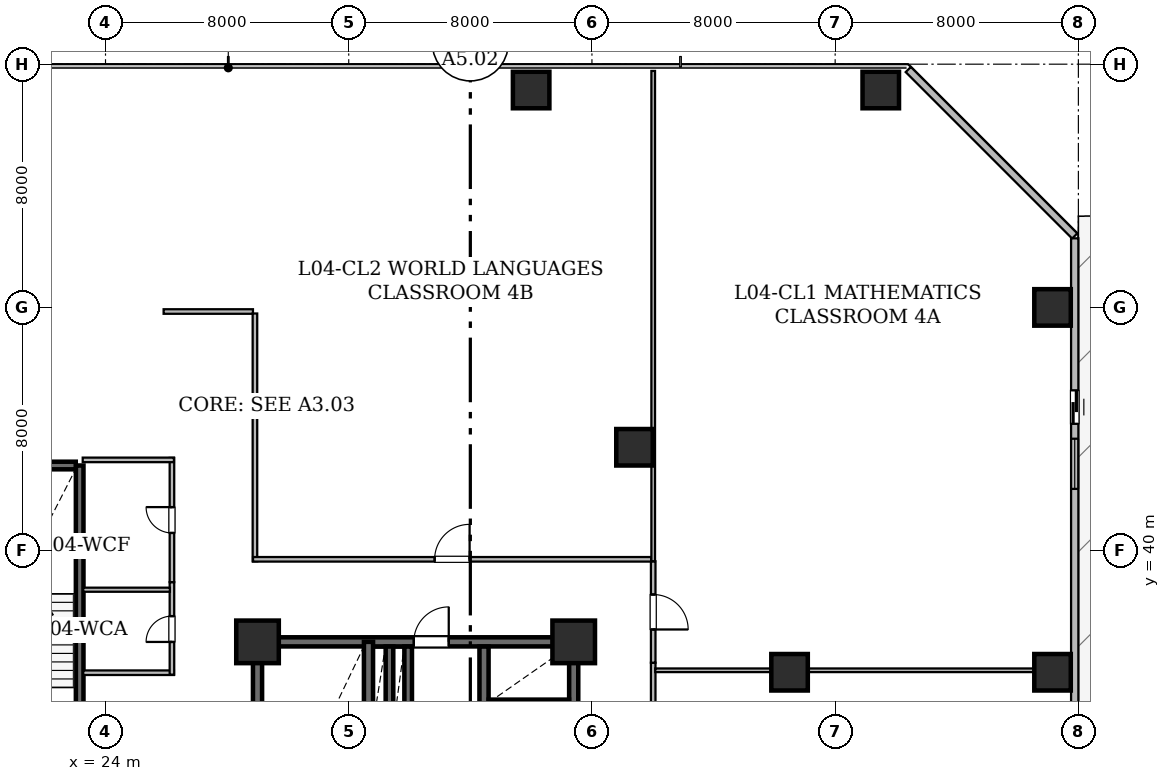
"""IFC4 building model, lengths in metres.
Left out: names, types, materials, properties, quantities, classifications, styles, units other than length and angle.
Written with IfcOpenShell. Run it as: python <this file> out.ifc"""

import sys

from ifc_helpers import new_model, si_unit, direction, frame, frame_2d, origin, origin_2d, place, context, subcontext, project, spatial, rectangle, hollow_rectangle, extrude, element, fill, save


model = new_model("IFC4")
c1 = context("Model", 3, precision=1e-05, world=origin(), true_north=direction((0.0, 1.0)))
c2 = subcontext(c1, "Body", "Model", "MODEL_VIEW")
j1 = project(units=[si_unit("LENGTHUNIT", "METRE"), si_unit("PLANEANGLEUNIT", "RADIAN")], contexts=[c1])
p1 = place(None, origin())
s1 = spatial("IfcSite", under=j1, at=p1, CompositionType="ELEMENT")
p2 = place(p1, origin())
s2 = spatial("IfcBuilding", under=s1, at=p2, CompositionType="ELEMENT")
p3 = place(p2, frame((0.0, 0.0, 20.4)))
s3 = spatial("IfcBuildingStorey", under=s2, at=p3, CompositionType="ELEMENT", Elevation=20.4)
for number, where, z_axis, x_axis in (
    (1, (29.0, 37.0, 0.0), (0.0, 0.0, 1.0), (1.0, 0.0, 0.0)),
    (2, (39.4, 37.0, 0.0), (0.0, 0.0, 1.0), (1.0, 0.0, 0.0)),
):
    element("IfcColumn", number, at=place(p3, frame(where, z_axis=z_axis, x_axis=x_axis)), inside=s3, PredefinedType="COLUMN", context=c2, shape_type="SweptSolid", body=[
        extrude(hollow_rectangle(XDim=1.4, YDim=1.4, WallThickness=0.07, at=origin_2d()), origin(), (0.0, 0.0, 1.0), 4.2),
    ])
for number, where, z_axis, x_axis in (
    (3, (38.0, 55.15, 0.0), (0.0, 0.0, 1.0), (1.0, 0.0, 0.0)),
    (4, (49.5, 55.15, 0.0), (0.0, 0.0, 1.0), (1.0, 0.0, 0.0)),
    (5, (55.15, 36.0, 0.0), (0.0, 0.0, 1.0), (1.0, 0.0, 0.0)),
    (6, (55.15, 48.0, 0.0), (0.0, 0.0, 1.0), (1.0, 0.0, 0.0)),
    (7, (41.4, 43.4, 0.0), (0.0, 0.0, 1.0), (1.0, 0.0, 0.0)),
    (8, (46.5, 36.0, 0.0), (0.0, 0.0, 1.0), (1.0, 0.0, 0.0)),
):
    element("IfcColumn", number, at=place(p3, frame(where, z_axis=z_axis, x_axis=x_axis)), inside=s3, PredefinedType="COLUMN", context=c2, shape_type="SweptSolid", body=[
        extrude(hollow_rectangle(XDim=1.2, YDim=1.2, WallThickness=0.06, at=origin_2d()), origin(), (0.0, 0.0, 1.0), 4.2),
    ])
p4 = place(p3, frame((50.405, 55.825, 0.0), z_axis=(0.0, 0.0, 1.0), x_axis=(0.707106781187, -0.707106781187, 0.0)))
e9 = element("IfcWall", 9, at=p4, inside=s3, PredefinedType="STANDARD", context=c2, shape_type="SweptSolid", body=[
    extrude(rectangle(XDim=7.743, YDim=0.24, at=frame_2d((3.871, 0.0))), origin(), (0.0, 0.0, 1.0), 3.92),
])
p5 = place(p3, frame((55.88, 50.272, 0.0), z_axis=(0.0, 0.0, 1.0), x_axis=(0.0, -1.0, 0.0)))
e10 = element("IfcWall", 10, at=p5, inside=s3, PredefinedType="STANDARD", context=c2, shape_type="SweptSolid", body=[
    extrude(rectangle(XDim=19.032, YDim=0.24, at=frame_2d((9.516, 0.0))), origin(), (0.0, 0.0, 1.0), 3.92),
])
p6 = place(p5, frame((5.0, 0.0, 0.0)))
e11 = element("IfcOpeningElement", 11, at=p6, cuts=e10, PredefinedType="OPENING", context=c2, shape_type="SweptSolid", body=[
    extrude(rectangle(XDim=1.1, YDim=2.2, at=frame_2d((0.55, 1.1))), frame((0.0, 0.13, 0.0), z_axis=(0.0, -1.0, 0.0), x_axis=(1.0, 0.0, 0.0)), (0.0, 0.0, 1.0), 0.26),
])
p7 = place(p5, frame((6.591, 0.0, 0.85)))
e12 = element("IfcOpeningElement", 12, at=p7, cuts=e10, PredefinedType="OPENING", context=c2, shape_type="SweptSolid", body=[
    extrude(rectangle(XDim=1.65, YDim=1.55, at=frame_2d((0.825, 0.775))), frame((0.0, 0.13, 0.0), z_axis=(0.0, -1.0, 0.0), x_axis=(1.0, 0.0, 0.0)), (0.0, 0.0, 1.0), 0.26),
])
p8 = place(p3, frame((29.0, 28.0, 0.0), z_axis=(0.0, 0.0, 1.0), x_axis=(0.0, 1.0, 0.0)))
e13 = element("IfcWall", 13, at=p8, inside=s3, PredefinedType="SHEAR", context=c2, shape_type="SweptSolid", body=[
    extrude(rectangle(XDim=9.0, YDim=0.3, at=frame_2d((4.5, 0.0))), origin(), (0.0, 0.0, 1.0), 3.92),
])
p9 = place(p3, frame((29.0, 37.0, 0.0), z_axis=(0.0, 0.0, 1.0), x_axis=(1.0, 0.0, 0.0)))
e14 = element("IfcWall", 14, at=p9, inside=s3, PredefinedType="SHEAR", context=c2, shape_type="SweptSolid", body=[
    extrude(rectangle(XDim=10.4, YDim=0.3, at=frame_2d((5.2, 0.0))), origin(), (0.0, 0.0, 1.0), 3.92),
])
p10 = place(p9, frame((5.14, 0.0, 0.0)))
e15 = element("IfcOpeningElement", 15, at=p10, cuts=e14, PredefinedType="OPENING", context=c2, shape_type="SweptSolid", body=[
    extrude(rectangle(XDim=1.15, YDim=2.2, at=frame_2d((0.575, 1.1))), frame((0.0, 0.16, 0.0), z_axis=(0.0, -1.0, 0.0), x_axis=(1.0, 0.0, 0.0)), (0.0, 0.0, 1.0), 0.32),
])
p11 = place(p3, frame((39.4, 24.4, 0.0), z_axis=(0.0, 0.0, 1.0), x_axis=(0.0, 1.0, 0.0)))
e16 = element("IfcWall", 16, at=p11, inside=s3, PredefinedType="SHEAR", context=c2, shape_type="SweptSolid", body=[
    extrude(rectangle(XDim=12.6, YDim=0.3, at=frame_2d((6.3, 0.0))), origin(), (0.0, 0.0, 1.0), 3.92),
])
p12 = place(p3, frame((32.65, 28.0, 0.0), z_axis=(0.0, 0.0, 1.0), x_axis=(0.0, 1.0, 0.0)))
e17 = element("IfcWall", 17, at=p12, inside=s3, PredefinedType="SHEAR", context=c2, shape_type="SweptSolid", body=[
    extrude(rectangle(XDim=9.0, YDim=0.3, at=frame_2d((4.5, 0.0))), origin(), (0.0, 0.0, 1.0), 3.92),
])
p13 = place(p12, frame((0.72, 0.0, 0.0)))
e18 = element("IfcOpeningElement", 18, at=p13, cuts=e17, PredefinedType="OPENING", context=c2, shape_type="SweptSolid", body=[
    extrude(rectangle(XDim=1.0, YDim=2.15, at=frame_2d((0.5, 1.075))), frame((0.0, 0.16, 0.0), z_axis=(0.0, -1.0, 0.0), x_axis=(1.0, 0.0, 0.0)), (0.0, 0.0, 1.0), 0.32),
])
p14 = place(p3, frame((36.45, 31.45, 0.0), z_axis=(0.0, 0.0, 1.0), x_axis=(0.0, 1.0, 0.0)))
e19 = element("IfcWall", 19, at=p14, inside=s3, PredefinedType="SHEAR", context=c2, shape_type="SweptSolid", body=[
    extrude(rectangle(XDim=5.396, YDim=0.3, at=frame_2d((2.698, 0.0))), origin(), (0.0, 0.0, 1.0), 3.92),
])
p15 = place(p3, frame((36.604, 34.975, 0.0), z_axis=(0.0, 0.0, 1.0), x_axis=(1.0, 0.0, 0.0)))
e20 = element("IfcWall", 20, at=p15, inside=s3, PredefinedType="SHEAR", context=c2, shape_type="SweptSolid", body=[
    extrude(rectangle(XDim=2.642, YDim=0.25, at=frame_2d((1.321, 0.0))), origin(), (0.0, 0.0, 1.0), 3.92),
])
p16 = place(p3, frame((33.955, 34.025, 0.0), z_axis=(0.0, 0.0, 1.0), x_axis=(0.0, 1.0, 0.0)))
e21 = element("IfcWall", 21, at=p16, inside=s3, PredefinedType="SHEAR", context=c2, shape_type="SweptSolid", body=[
    extrude(rectangle(XDim=2.821, YDim=0.25, at=frame_2d((1.411, 0.0))), origin(), (0.0, 0.0, 1.0), 3.92),
])
p17 = place(p3, frame((33.34, 34.279, 0.0), z_axis=(0.0, 0.0, 1.0), x_axis=(0.0, 1.0, 0.0)))
e22 = element("IfcWall", 22, at=p17, inside=s3, PredefinedType="SHEAR", context=c2, shape_type="SweptSolid", body=[
    extrude(rectangle(XDim=2.567, YDim=0.25, at=frame_2d((1.283, 0.0))), origin(), (0.0, 0.0, 1.0), 3.92),
])
p18 = place(p3, frame((23.15, 33.6, 0.0), z_axis=(0.0, 0.0, 1.0), x_axis=(0.0, 1.0, 0.0)))
e23 = element("IfcWall", 23, at=p18, inside=s3, PredefinedType="SHEAR", context=c2, shape_type="SweptSolid", body=[
    extrude(rectangle(XDim=9.2, YDim=0.25, at=frame_2d((4.6, 0.0))), origin(), (0.0, 0.0, 1.0), 3.92),
])
p19 = place(p18, frame((0.4, 0.0, 0.0)))
e24 = element("IfcOpeningElement", 24, at=p19, cuts=e23, PredefinedType="OPENING", context=c2, shape_type="SweptSolid", body=[
    extrude(rectangle(XDim=1.0, YDim=2.15, at=frame_2d((0.5, 1.075))), frame((0.0, 0.135, 0.0), z_axis=(0.0, -1.0, 0.0), x_axis=(1.0, 0.0, 0.0)), (0.0, 0.0, 1.0), 0.27),
])
p20 = place(p3, frame((19.329, 42.8, 0.0), z_axis=(0.0, 0.0, 1.0), x_axis=(1.0, 0.0, 0.0)))
e25 = element("IfcWall", 25, at=p20, inside=s3, PredefinedType="SHEAR", context=c2, shape_type="SweptSolid", body=[
    extrude(rectangle(XDim=3.692, YDim=0.25, at=frame_2d((1.846, 0.0))), origin(), (0.0, 0.0, 1.0), 3.92),
])
p21 = place(p3, frame((23.267, 35.985, 0.0), z_axis=(0.0, 0.0, 1.0), x_axis=(1.0, 0.0, 0.0)))
e26 = element("IfcWall", 26, at=p21, inside=s3, PredefinedType="STANDARD", context=c2, shape_type="SweptSolid", body=[
    extrude(rectangle(XDim=2.983, YDim=0.15, at=frame_2d((1.491, 0.0))), origin(), (0.0, 0.0, 1.0), 3.92),
])
p22 = place(p3, frame((26.185, 35.922, 0.0), z_axis=(0.0, 0.0, 1.0), x_axis=(0.0, 1.0, 0.0)))
e27 = element("IfcWall", 27, at=p22, inside=s3, PredefinedType="STANDARD", context=c2, shape_type="SweptSolid", body=[
    extrude(rectangle(XDim=3.042, YDim=0.15, at=frame_2d((1.521, 0.0))), origin(), (0.0, 0.0, 1.0), 3.92),
])
p23 = place(p22, frame((1.075, 0.0, 0.0)))
e28 = element("IfcOpeningElement", 28, at=p23, cuts=e27, PredefinedType="OPENING", context=c2, shape_type="SweptSolid", body=[
    extrude(rectangle(XDim=0.85, YDim=2.1, at=frame_2d((0.425, 1.05))), frame((0.0, 0.085, 0.0), z_axis=(0.0, -1.0, 0.0), x_axis=(1.0, 0.0, 0.0)), (0.0, 0.0, 1.0), 0.17),
])
p24 = place(p3, frame((26.185, 38.964, 0.0), z_axis=(0.0, 0.0, 1.0), x_axis=(0.0, 1.0, 0.0)))
e29 = element("IfcWall", 29, at=p24, inside=s3, PredefinedType="STANDARD", context=c2, shape_type="SweptSolid", body=[
    extrude(rectangle(XDim=4.086, YDim=0.15, at=frame_2d((2.043, 0.0))), origin(), (0.0, 0.0, 1.0), 3.92),
])
p25 = place(p24, frame((1.618, 0.0, 0.0)))
e30 = element("IfcOpeningElement", 30, at=p25, cuts=e29, PredefinedType="OPENING", context=c2, shape_type="SweptSolid", body=[
    extrude(rectangle(XDim=0.85, YDim=2.1, at=frame_2d((0.425, 1.05))), frame((0.0, 0.085, 0.0), z_axis=(0.0, -1.0, 0.0), x_axis=(1.0, 0.0, 0.0)), (0.0, 0.0, 1.0), 0.17),
])
p26 = place(p3, frame((26.25, 42.985, 0.0), z_axis=(0.0, 0.0, 1.0), x_axis=(-1.0, 0.0, 0.0)))
e31 = element("IfcWall", 31, at=p26, inside=s3, PredefinedType="STANDARD", context=c2, shape_type="SweptSolid", body=[
    extrude(rectangle(XDim=3.0, YDim=0.15, at=frame_2d((1.5, 0.0))), origin(), (0.0, 0.0, 1.0), 3.92),
])
p27 = place(p3, frame((42.015, 36.314, 0.0), z_axis=(0.0, 0.0, 1.0), x_axis=(0.0, -1.0, 0.0)))
e32 = element("IfcWall", 32, at=p27, inside=s3, PredefinedType="STANDARD", context=c2, shape_type="SweptSolid", body=[
    extrude(rectangle(XDim=19.964, YDim=0.15, at=frame_2d((9.982, 0.0))), origin(), (0.0, 0.0, 1.0), 3.055),
])
p28 = place(p27, frame((9.428, 0.0, 0.0)))
e33 = element("IfcOpeningElement", 33, at=p28, cuts=e32, PredefinedType="OPENING", context=c2, shape_type="SweptSolid", body=[
    extrude(rectangle(XDim=1.15, YDim=2.2, at=frame_2d((0.575, 1.1))), frame((0.0, 0.085, 0.0), z_axis=(0.0, -1.0, 0.0), x_axis=(1.0, 0.0, 0.0)), (0.0, 0.0, 1.0), 0.17),
])
p29 = place(p3, frame((42.015, 39.65, 0.0), z_axis=(0.0, 0.0, 1.0), x_axis=(0.0, -1.0, 0.0)))
e34 = element("IfcWall", 34, at=p29, inside=s3, PredefinedType="STANDARD", context=c2, shape_type="SweptSolid", body=[
    extrude(rectangle(XDim=3.336, YDim=0.15, at=frame_2d((1.668, 0.0))), origin(), (0.0, 0.0, 1.0), 3.055),
])
p30 = place(p29, frame((1.093, 0.0, 0.0)))
e35 = element("IfcOpeningElement", 35, at=p30, cuts=e34, PredefinedType="OPENING", context=c2, shape_type="SweptSolid", body=[
    extrude(rectangle(XDim=1.15, YDim=2.2, at=frame_2d((0.575, 1.1))), frame((0.0, 0.085, 0.0), z_axis=(0.0, -1.0, 0.0), x_axis=(1.0, 0.0, 0.0)), (0.0, 0.0, 1.0), 0.17),
])
p31 = place(p3, frame((25.911, 47.865, 0.0), z_axis=(0.0, 0.0, 1.0), x_axis=(1.0, 0.0, 0.0)))
e36 = element("IfcWall", 36, at=p31, inside=s3, PredefinedType="STANDARD", context=c2, shape_type="SweptSolid", body=[
    extrude(rectangle(XDim=2.939, YDim=0.15, at=frame_2d((1.47, 0.0))), origin(), (0.0, 0.0, 1.0), 3.92),
])
p32 = place(p3, frame((28.915, 47.8, 0.0), z_axis=(0.0, 0.0, 1.0), x_axis=(0.0, -1.0, 0.0)))
e37 = element("IfcWall", 37, at=p32, inside=s3, PredefinedType="STANDARD", context=c2, shape_type="SweptSolid", body=[
    extrude(rectangle(XDim=8.15, YDim=0.15, at=frame_2d((4.075, 0.0))), origin(), (0.0, 0.0, 1.0), 3.055),
])
p33 = place(p3, frame((28.852, 39.715, 0.0), z_axis=(0.0, 0.0, 1.0), x_axis=(1.0, 0.0, 0.0)))
e38 = element("IfcWall", 38, at=p33, inside=s3, PredefinedType="STANDARD", context=c2, shape_type="SweptSolid", body=[
    extrude(rectangle(XDim=13.098, YDim=0.15, at=frame_2d((6.549, 0.0))), origin(), (0.0, 0.0, 1.0), 3.055),
])
p34 = place(p33, frame((5.974, 0.0, 0.0)))
e39 = element("IfcOpeningElement", 39, at=p34, cuts=e38, PredefinedType="OPENING", context=c2, shape_type="SweptSolid", body=[
    extrude(rectangle(XDim=1.15, YDim=2.2, at=frame_2d((0.575, 1.1))), frame((0.0, 0.085, 0.0), z_axis=(0.0, -1.0, 0.0), x_axis=(1.0, 0.0, 0.0)), (0.0, 0.0, 1.0), 0.17),
])
p35 = place(p3, frame((23.267, 38.715, 0.0), z_axis=(0.0, 0.0, 1.0), x_axis=(1.0, 0.0, 0.0)))
e40 = element("IfcWall", 40, at=p35, inside=s3, PredefinedType="PARTITIONING", context=c2, shape_type="SweptSolid", body=[
    extrude(rectangle(XDim=2.851, YDim=0.135, at=frame_2d((1.425, 0.0))), origin(), (0.0, 0.0, 1.0), 3.92),
])
p36 = place(p3, frame((42.082, 36.065, 0.0), z_axis=(0.0, 0.0, 1.0), x_axis=(1.0, 0.0, 0.0)))
e41 = element("IfcWall", 41, at=p36, inside=s3, PredefinedType="PARTITIONING", context=c2, shape_type="SweptSolid", body=[
    extrude(rectangle(XDim=13.318, YDim=0.12, at=frame_2d((6.659, 0.0))), origin(), (0.0, 0.0, 1.0), 3.055),
])
p37 = place(p3, frame((42.015, 39.65, 0.0), z_axis=(0.0, 0.0, 1.0), x_axis=(0.0, 1.0, 0.0)))
e42 = element("IfcWall", 42, at=p37, inside=s3, PredefinedType="PARTITIONING", context=c2, shape_type="SweptSolid", body=[
    extrude(rectangle(XDim=16.128, YDim=0.12, at=frame_2d((8.064, 0.0))), origin(), (0.0, 0.0, 1.0), 3.055),
])
p38 = place(p6, origin())
e43 = element("IfcDoor", 43, at=p38, inside=s3, OperationType="SLIDING_TO_LEFT", PredefinedType="DOOR", context=c2, shape_type="SweptSolid", body=[
    extrude(rectangle(XDim=1.1, YDim=2.2, at=frame_2d((0.55, 1.1))), frame((0.0, 0.025, 0.0), z_axis=(0.0, -1.0, 0.0), x_axis=(1.0, 0.0, 0.0)), (0.0, 0.0, 1.0), 0.05),
])
fill(e11, e43)
p39 = place(p7, origin())
e44 = element("IfcWindow", 44, at=p39, inside=s3, PartitioningType="SINGLE_PANEL", PredefinedType="WINDOW", context=c2, shape_type="SweptSolid", body=[
    extrude(rectangle(XDim=1.65, YDim=1.55, at=frame_2d((0.825, 0.775))), frame((0.0, 0.03, 0.0), z_axis=(0.0, -1.0, 0.0), x_axis=(1.0, 0.0, 0.0)), (0.0, 0.0, 1.0), 0.06),
])
fill(e12, e44)
p40 = place(p10, origin())
e45 = element("IfcDoor", 45, at=p40, inside=s3, OperationType="SINGLE_SWING_RIGHT", PredefinedType="DOOR", context=c2, shape_type="SweptSolid", body=[
    extrude(rectangle(XDim=1.15, YDim=2.2, at=frame_2d((0.575, 1.1))), frame((0.0, 0.025, 0.0), z_axis=(0.0, -1.0, 0.0), x_axis=(1.0, 0.0, 0.0)), (0.0, 0.0, 1.0), 0.05),
])
fill(e15, e45)
p41 = place(p23, origin())
e46 = element("IfcDoor", 46, at=p41, inside=s3, OperationType="SINGLE_SWING_LEFT", PredefinedType="DOOR", context=c2, shape_type="SweptSolid", body=[
    extrude(rectangle(XDim=0.85, YDim=2.1, at=frame_2d((0.425, 1.05))), frame((0.0, 0.025, 0.0), z_axis=(0.0, -1.0, 0.0), x_axis=(1.0, 0.0, 0.0)), (0.0, 0.0, 1.0), 0.05),
])
fill(e28, e46)
p42 = place(p25, origin())
e47 = element("IfcDoor", 47, at=p42, inside=s3, OperationType="SINGLE_SWING_RIGHT", PredefinedType="DOOR", context=c2, shape_type="SweptSolid", body=[
    extrude(rectangle(XDim=0.85, YDim=2.1, at=frame_2d((0.425, 1.05))), frame((0.0, 0.025, 0.0), z_axis=(0.0, -1.0, 0.0), x_axis=(1.0, 0.0, 0.0)), (0.0, 0.0, 1.0), 0.05),
])
fill(e30, e47)
p43 = place(p30, origin())
e48 = element("IfcDoor", 48, at=p43, inside=s3, OperationType="SINGLE_SWING_RIGHT", PredefinedType="DOOR", context=c2, shape_type="SweptSolid", body=[
    extrude(rectangle(XDim=1.15, YDim=2.2, at=frame_2d((0.575, 1.1))), frame((0.0, 0.025, 0.0), z_axis=(0.0, -1.0, 0.0), x_axis=(1.0, 0.0, 0.0)), (0.0, 0.0, 1.0), 0.05),
])
fill(e35, e48)
p44 = place(p34, origin())
e49 = element("IfcDoor", 49, at=p44, inside=s3, OperationType="SINGLE_SWING_RIGHT", PredefinedType="DOOR", context=c2, shape_type="SweptSolid", body=[
    extrude(rectangle(XDim=1.15, YDim=2.2, at=frame_2d((0.575, 1.1))), frame((0.0, 0.025, 0.0), z_axis=(0.0, -1.0, 0.0), x_axis=(1.0, 0.0, 0.0)), (0.0, 0.0, 1.0), 0.05),
])
fill(e39, e49)
save(model, sys.argv[1])
